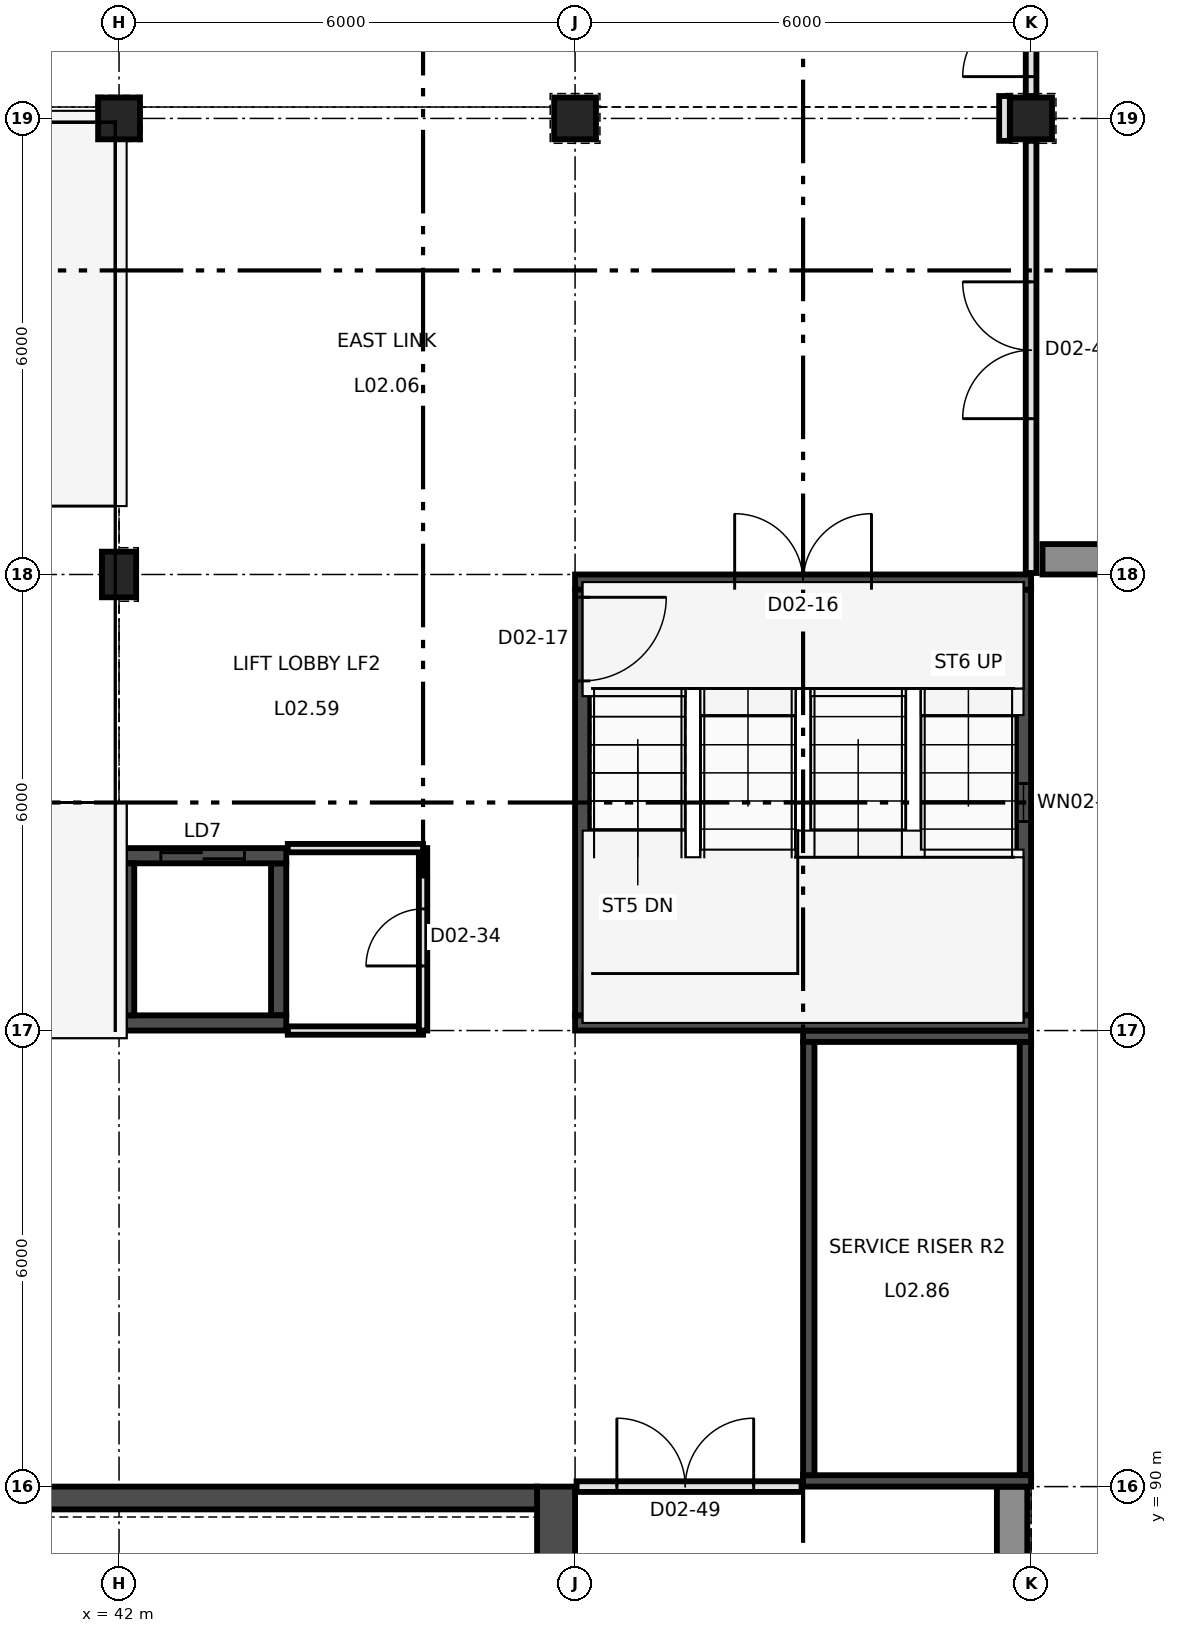
"""IFC4 building model, lengths in metres.
Left out: names, types, materials, properties, quantities, classifications, styles, units other than length and angle.
Written with IfcOpenShell. Run it as: python <this file> out.ifc"""

import sys

from ifc_helpers import new_model, si_unit, direction, frame, frame_2d, origin, origin_2d, place, context, subcontext, project, spatial, rectangle, extrude, element, fill, save


model = new_model("IFC4")
c1 = context("Model", 3, precision=1e-05, world=origin(), true_north=direction((0.0, 1.0)))
c2 = subcontext(c1, "Body", "Model", "MODEL_VIEW")
j1 = project(units=[si_unit("LENGTHUNIT", "METRE"), si_unit("PLANEANGLEUNIT", "RADIAN")], contexts=[c1])
p1 = place(None, origin())
s1 = spatial("IfcSite", under=j1, at=p1, CompositionType="ELEMENT")
p2 = place(p1, origin())
s2 = spatial("IfcBuilding", under=s1, at=p2, CompositionType="ELEMENT")
p3 = place(p2, frame((0.0, 0.0, 12.0)))
s3 = spatial("IfcBuildingStorey", under=s2, at=p3, CompositionType="ELEMENT", Elevation=12.0)
p4 = place(p3, frame((42.0, 102.0, 0.0), z_axis=(0.0, 0.0, 1.0), x_axis=(1.0, 0.0, 0.0)))
e1 = element("IfcColumn", 1, at=p4, inside=s3, PredefinedType="COLUMN", context=c2, shape_type="SweptSolid", body=[
    extrude(rectangle(XDim=0.45, YDim=0.6, at=origin_2d()), origin(), (0.0, 0.0, 1.0), 4.5),
])
for number, where, z_axis, x_axis in (
    (2, (42.0, 108.0, 0.0), (0.0, 0.0, 1.0), (1.0, 0.0, 0.0)),
    (3, (48.0, 108.0, 0.0), (0.0, 0.0, 1.0), (1.0, 0.0, 0.0)),
):
    element("IfcColumn", number, at=place(p3, frame(where, z_axis=z_axis, x_axis=x_axis)), inside=s3, PredefinedType="COLUMN", context=c2, shape_type="SweptSolid", body=[
        extrude(rectangle(XDim=0.55, YDim=0.55, at=origin_2d()), origin(), (0.0, 0.0, 1.0), 4.5),
    ])
p5 = place(p3, frame((54.0, 108.0, 0.0), z_axis=(0.0, 0.0, 1.0), x_axis=(1.0, 0.0, 0.0)))
e4 = element("IfcColumn", 4, at=p5, inside=s3, PredefinedType="COLUMN", context=c2, shape_type="SweptSolid", body=[
    extrude(rectangle(XDim=0.55, YDim=0.55, at=origin_2d()), origin(), (0.0, 0.0, 1.0), 4.25),
])
p6 = place(p3, frame((48.0, 101.9, 0.0), z_axis=(0.0, 0.0, 1.0), x_axis=(1.0, 0.0, 0.0)))
e5 = element("IfcWall", 5, at=p6, inside=s3, PredefinedType="SHEAR", context=c2, shape_type="SweptSolid", body=[
    extrude(rectangle(XDim=6.0, YDim=0.2, at=frame_2d((3.0, 0.0))), origin(), (0.0, 0.0, 1.0), 4.5),
])
p7 = place(p6, frame((2.1, 0.0, 0.0)))
e6 = element("IfcOpeningElement", 6, at=p7, cuts=e5, PredefinedType="OPENING", context=c2, shape_type="SweptSolid", body=[
    extrude(rectangle(XDim=1.8, YDim=2.2, at=frame_2d((0.9, 1.1))), frame((0.0, 0.11, 0.0), z_axis=(0.0, -1.0, 0.0), x_axis=(1.0, 0.0, 0.0)), (0.0, 0.0, 1.0), 0.22),
])
p8 = place(p3, frame((48.0, 96.1, 0.0), z_axis=(0.0, 0.0, 1.0), x_axis=(1.0, 0.0, 0.0)))
e7 = element("IfcWall", 7, at=p8, inside=s3, PredefinedType="SHEAR", context=c2, shape_type="SweptSolid", body=[
    extrude(rectangle(XDim=6.0, YDim=0.2, at=frame_2d((3.0, 0.0))), origin(), (0.0, 0.0, 1.0), 4.5),
])
p9 = place(p3, frame((48.1, 96.2, 0.0), z_axis=(0.0, 0.0, 1.0), x_axis=(0.0, 1.0, 0.0)))
e8 = element("IfcWall", 8, at=p9, inside=s3, PredefinedType="SHEAR", context=c2, shape_type="SweptSolid", body=[
    extrude(rectangle(XDim=5.6, YDim=0.2, at=frame_2d((2.8, 0.0))), origin(), (0.0, 0.0, 1.0), 4.5),
])
p10 = place(p9, frame((4.4, 0.0, 0.0)))
e9 = element("IfcOpeningElement", 9, at=p10, cuts=e8, PredefinedType="OPENING", context=c2, shape_type="SweptSolid", body=[
    extrude(rectangle(XDim=1.1, YDim=2.2, at=frame_2d((0.55, 1.1))), frame((0.0, 0.11, 0.0), z_axis=(0.0, -1.0, 0.0), x_axis=(1.0, 0.0, 0.0)), (0.0, 0.0, 1.0), 0.22),
])
p11 = place(p3, frame((53.9, 96.2, 0.0), z_axis=(0.0, 0.0, 1.0), x_axis=(0.0, 1.0, 0.0)))
e10 = element("IfcWall", 10, at=p11, inside=s3, PredefinedType="SHEAR", context=c2, shape_type="SweptSolid", body=[
    extrude(rectangle(XDim=5.6, YDim=0.2, at=frame_2d((2.8, 0.0))), origin(), (0.0, 0.0, 1.0), 4.5),
])
p12 = place(p11, frame((2.55, 0.0, 0.9)))
e11 = element("IfcOpeningElement", 11, at=p12, cuts=e10, PredefinedType="OPENING", context=c2, shape_type="SweptSolid", body=[
    extrude(rectangle(XDim=0.5, YDim=2.1, at=frame_2d((0.25, 1.05))), frame((0.0, 0.11, 0.0), z_axis=(0.0, -1.0, 0.0), x_axis=(1.0, 0.0, 0.0)), (0.0, 0.0, 1.0), 0.22),
])
p13 = place(p3, frame((42.0, 98.3, 0.0), z_axis=(0.0, 0.0, 1.0), x_axis=(1.0, 0.0, 0.0)))
e12 = element("IfcWall", 12, at=p13, inside=s3, PredefinedType="SHEAR", context=c2, shape_type="SweptSolid", body=[
    extrude(rectangle(XDim=2.2, YDim=0.2, at=frame_2d((1.1, 0.0))), origin(), (0.0, 0.0, 1.0), 4.5),
])
p14 = place(p13, frame((0.55, 0.0, 0.0)))
e13 = element("IfcOpeningElement", 13, at=p14, cuts=e12, PredefinedType="OPENING", context=c2, shape_type="SweptSolid", body=[
    extrude(rectangle(XDim=1.1, YDim=2.1, at=frame_2d((0.55, 1.05))), frame((0.0, 0.11, 0.0), z_axis=(0.0, -1.0, 0.0), x_axis=(1.0, 0.0, 0.0)), (0.0, 0.0, 1.0), 0.22),
])
p15 = place(p3, frame((42.0, 96.1, 0.0), z_axis=(0.0, 0.0, 1.0), x_axis=(1.0, 0.0, 0.0)))
e14 = element("IfcWall", 14, at=p15, inside=s3, PredefinedType="SHEAR", context=c2, shape_type="SweptSolid", body=[
    extrude(rectangle(XDim=2.2, YDim=0.2, at=frame_2d((1.1, 0.0))), origin(), (0.0, 0.0, 1.0), 4.5),
])
for number, where, z_axis, x_axis in (
    (15, (42.1, 96.2, 0.0), (0.0, 0.0, 1.0), (0.0, 1.0, 0.0)),
    (16, (44.1, 96.2, 0.0), (0.0, 0.0, 1.0), (0.0, 1.0, 0.0)),
):
    element("IfcWall", number, at=place(p3, frame(where, z_axis=z_axis, x_axis=x_axis)), inside=s3, PredefinedType="SHEAR", context=c2, shape_type="SweptSolid", body=[
        extrude(rectangle(XDim=2.0, YDim=0.2, at=frame_2d((1.0, 0.0))), origin(), (0.0, 0.0, 1.0), 4.5),
    ])
for number, where, z_axis, x_axis in (
    (17, (51.0, 95.925, 0.0), (0.0, 0.0, 1.0), (1.0, 0.0, 0.0)),
    (18, (51.0, 90.075, 0.0), (0.0, 0.0, 1.0), (1.0, 0.0, 0.0)),
):
    element("IfcWall", number, at=place(p3, frame(where, z_axis=z_axis, x_axis=x_axis)), inside=s3, PredefinedType="SHEAR", context=c2, shape_type="SweptSolid", body=[
        extrude(rectangle(XDim=3.0, YDim=0.15, at=frame_2d((1.5, 0.0))), origin(), (0.0, 0.0, 1.0), 4.5),
    ])
for number, where, z_axis, x_axis in (
    (19, (51.075, 90.15, 0.0), (0.0, 0.0, 1.0), (0.0, 1.0, 0.0)),
    (20, (53.925, 90.15, 0.0), (0.0, 0.0, 1.0), (0.0, 1.0, 0.0)),
):
    element("IfcWall", number, at=place(p3, frame(where, z_axis=z_axis, x_axis=x_axis)), inside=s3, PredefinedType="SHEAR", context=c2, shape_type="SweptSolid", body=[
        extrude(rectangle(XDim=5.7, YDim=0.15, at=frame_2d((2.85, 0.0))), origin(), (0.0, 0.0, 1.0), 4.5),
    ])
p16 = place(p3, frame((47.75, 54.5, 0.0), z_axis=(0.0, 0.0, 1.0), x_axis=(0.0, 1.0, 0.0)))
e21 = element("IfcWall", 21, at=p16, inside=s3, PredefinedType="SHEAR", context=c2, shape_type="SweptSolid", body=[
    extrude(rectangle(XDim=35.5, YDim=0.5, at=frame_2d((17.75, 0.0))), origin(), (0.0, 0.0, 1.0), 4.5),
])
p17 = place(p16, frame((25.35, 0.0, 0.0)))
e22 = element("IfcOpeningElement", 22, at=p17, cuts=e21, PredefinedType="OPENING", context=c2, shape_type="SweptSolid", body=[
    extrude(rectangle(XDim=1.3, YDim=2.1, at=frame_2d((0.65, 1.05))), frame((0.0, 0.26, 0.0), z_axis=(0.0, -1.0, 0.0), x_axis=(1.0, 0.0, 0.0)), (0.0, 0.0, 1.0), 0.52),
])
p18 = place(p3, frame((18.5, 89.85, 0.0), z_axis=(0.0, 0.0, 1.0), x_axis=(1.0, 0.0, 0.0)))
e23 = element("IfcWall", 23, at=p18, inside=s3, PredefinedType="SHEAR", context=c2, shape_type="SweptSolid", body=[
    extrude(rectangle(XDim=29.0, YDim=0.3, at=frame_2d((14.5, 0.0))), origin(), (0.0, 0.0, 1.0), 4.5),
])
p19 = place(p3, frame((60.0, 102.2, 0.0), z_axis=(0.0, 0.0, 1.0), x_axis=(-1.0, 0.0, 0.0)))
e24 = element("IfcWall", 24, at=p19, inside=s3, PredefinedType="SOLIDWALL", context=c2, shape_type="SweptSolid", body=[
    extrude(rectangle(XDim=5.85, YDim=0.4, at=frame_2d((2.925, 0.0))), origin(), (0.0, 0.0, 1.0), 4.25),
])
p20 = place(p19, frame((1.725, 0.0, 0.9)))
e25 = element("IfcOpeningElement", 25, at=p20, cuts=e24, PredefinedType="OPENING", context=c2, shape_type="SweptSolid", body=[
    extrude(rectangle(XDim=2.4, YDim=2.45, at=frame_2d((1.2, 1.225))), frame((0.0, 0.21, 0.0), z_axis=(0.0, -1.0, 0.0), x_axis=(1.0, 0.0, 0.0)), (0.0, 0.0, 1.0), 0.42),
])
p21 = place(p3, frame((53.75, 90.0, 0.0), z_axis=(0.0, 0.0, 1.0), x_axis=(0.0, -1.0, 0.0)))
e26 = element("IfcWall", 26, at=p21, inside=s3, PredefinedType="SOLIDWALL", context=c2, shape_type="SweptSolid", body=[
    extrude(rectangle(XDim=5.7, YDim=0.4, at=frame_2d((2.85, 0.0))), origin(), (0.0, 0.0, 1.0), 3.55),
])
p22 = place(p3, frame((44.22, 96.0, 0.0), z_axis=(0.0, 0.0, 1.0), x_axis=(1.0, 0.0, 0.0)))
e27 = element("IfcWall", 27, at=p22, inside=s3, PredefinedType="PARTITIONING", context=c2, shape_type="SweptSolid", body=[
    extrude(rectangle(XDim=1.78, YDim=0.11, at=frame_2d((0.89, 0.0))), origin(), (0.0, 0.0, 1.0), 3.65),
])
p23 = place(p3, frame((46.0, 96.0, 0.0), z_axis=(0.0, 0.0, 1.0), x_axis=(0.0, 1.0, 0.0)))
e28 = element("IfcWall", 28, at=p23, inside=s3, PredefinedType="PARTITIONING", context=c2, shape_type="SweptSolid", body=[
    extrude(rectangle(XDim=2.4, YDim=0.11, at=frame_2d((1.2, 0.0))), origin(), (0.0, 0.0, 1.0), 3.65),
])
p24 = place(p23, frame((0.85, 0.0, 0.0)))
e29 = element("IfcOpeningElement", 29, at=p24, cuts=e28, PredefinedType="OPENING", context=c2, shape_type="SweptSolid", body=[
    extrude(rectangle(XDim=0.75, YDim=2.04, at=frame_2d((0.375, 1.02))), frame((0.0, 0.065, 0.0), z_axis=(0.0, -1.0, 0.0), x_axis=(1.0, 0.0, 0.0)), (0.0, 0.0, 1.0), 0.13),
])
p25 = place(p3, frame((44.22, 98.4, 0.0), z_axis=(0.0, 0.0, 1.0), x_axis=(1.0, 0.0, 0.0)))
e30 = element("IfcWall", 30, at=p25, inside=s3, PredefinedType="PARTITIONING", context=c2, shape_type="SweptSolid", body=[
    extrude(rectangle(XDim=1.78, YDim=0.11, at=frame_2d((0.89, 0.0))), origin(), (0.0, 0.0, 1.0), 4.25),
])
p26 = place(p3, frame((48.02, 90.0, 0.0), z_axis=(0.0, 0.0, 1.0), x_axis=(1.0, 0.0, 0.0)))
e31 = element("IfcWall", 31, at=p26, inside=s3, PredefinedType="PARTITIONING", context=c2, shape_type="SweptSolid", body=[
    extrude(rectangle(XDim=2.96, YDim=0.14, at=frame_2d((1.48, 0.0))), origin(), (0.0, 0.0, 1.0), 3.65),
])
p27 = place(p26, frame((0.53, 0.0, 0.0)))
e32 = element("IfcOpeningElement", 32, at=p27, cuts=e31, PredefinedType="OPENING", context=c2, shape_type="SweptSolid", body=[
    extrude(rectangle(XDim=1.8, YDim=2.1, at=frame_2d((0.9, 1.05))), frame((0.0, 0.08, 0.0), z_axis=(0.0, -1.0, 0.0), x_axis=(1.0, 0.0, 0.0)), (0.0, 0.0, 1.0), 0.16),
])
p28 = place(p3, frame((54.0, 102.02, 0.0), z_axis=(0.0, 0.0, 1.0), x_axis=(0.0, 1.0, 0.0)))
e33 = element("IfcWall", 33, at=p28, inside=s3, PredefinedType="PARTITIONING", context=c2, shape_type="SweptSolid", body=[
    extrude(rectangle(XDim=5.685, YDim=0.14, at=frame_2d((2.843, 0.0))), origin(), (0.0, 0.0, 1.0), 3.55),
])
p29 = place(p28, frame((2.03, 0.0, 0.0)))
e34 = element("IfcOpeningElement", 34, at=p29, cuts=e33, PredefinedType="OPENING", context=c2, shape_type="SweptSolid", body=[
    extrude(rectangle(XDim=1.8, YDim=2.1, at=frame_2d((0.9, 1.05))), frame((0.0, 0.08, 0.0), z_axis=(0.0, -1.0, 0.0), x_axis=(1.0, 0.0, 0.0)), (0.0, 0.0, 1.0), 0.16),
])
p30 = place(p3, frame((54.0, 108.295, 0.0), z_axis=(0.0, 0.0, 1.0), x_axis=(0.0, 1.0, 0.0)))
e35 = element("IfcWall", 35, at=p30, inside=s3, PredefinedType="PARTITIONING", context=c2, shape_type="SweptSolid", body=[
    extrude(rectangle(XDim=5.41, YDim=0.14, at=frame_2d((2.705, 0.0))), origin(), (0.0, 0.0, 1.0), 3.45),
])
p31 = place(p30, frame((0.255, 0.0, 0.0)))
e36 = element("IfcOpeningElement", 36, at=p31, cuts=e35, PredefinedType="OPENING", context=c2, shape_type="SweptSolid", body=[
    extrude(rectangle(XDim=1.8, YDim=2.1, at=frame_2d((0.9, 1.05))), frame((0.0, 0.08, 0.0), z_axis=(0.0, -1.0, 0.0), x_axis=(1.0, 0.0, 0.0)), (0.0, 0.0, 1.0), 0.16),
])
p32 = place(p3, frame((53.65, 107.705, 0.0), z_axis=(0.0, 0.0, 1.0), x_axis=(0.0, 1.0, 0.0)))
e37 = element("IfcWall", 37, at=p32, inside=s3, PredefinedType="PARTITIONING", context=c2, shape_type="SweptSolid", body=[
    extrude(rectangle(XDim=0.59, YDim=0.14, at=frame_2d((0.295, 0.0))), origin(), (0.0, 0.0, 1.0), 3.55),
])
p33 = place(p12, origin())
e38 = element("IfcWindow", 38, at=p33, inside=s3, PartitioningType="SINGLE_PANEL", PredefinedType="WINDOW", context=c2, shape_type="SweptSolid", body=[
    extrude(rectangle(XDim=0.5, YDim=2.1, at=frame_2d((0.25, 1.05))), frame((0.0, 0.03, 0.0), z_axis=(0.0, -1.0, 0.0), x_axis=(1.0, 0.0, 0.0)), (0.0, 0.0, 1.0), 0.06),
])
fill(e11, e38)
p34 = place(p7, frame((1.8, 0.0, 0.0), z_axis=(0.0, 0.0, 1.0), x_axis=(-1.0, 0.0, 0.0)))
e39 = element("IfcDoor", 39, at=p34, inside=s3, OperationType="DOUBLE_DOOR_SINGLE_SWING", PredefinedType="DOOR", context=c2, shape_type="SweptSolid", body=[
    extrude(rectangle(XDim=1.8, YDim=2.2, at=frame_2d((0.9, 1.1))), frame((0.0, 0.025, 0.0), z_axis=(0.0, -1.0, 0.0), x_axis=(1.0, 0.0, 0.0)), (0.0, 0.0, 1.0), 0.05),
])
fill(e6, e39)
p35 = place(p10, frame((1.1, 0.0, 0.0), z_axis=(0.0, 0.0, 1.0), x_axis=(-1.0, 0.0, 0.0)))
e40 = element("IfcDoor", 40, at=p35, inside=s3, OperationType="SINGLE_SWING_RIGHT", PredefinedType="DOOR", context=c2, shape_type="SweptSolid", body=[
    extrude(rectangle(XDim=1.1, YDim=2.2, at=frame_2d((0.55, 1.1))), frame((0.0, 0.025, 0.0), z_axis=(0.0, -1.0, 0.0), x_axis=(1.0, 0.0, 0.0)), (0.0, 0.0, 1.0), 0.05),
])
fill(e9, e40)
p36 = place(p24, origin())
e41 = element("IfcDoor", 41, at=p36, inside=s3, OperationType="SINGLE_SWING_LEFT", PredefinedType="DOOR", context=c2, shape_type="SweptSolid", body=[
    extrude(rectangle(XDim=0.75, YDim=2.04, at=frame_2d((0.375, 1.02))), frame((0.0, 0.025, 0.0), z_axis=(0.0, -1.0, 0.0), x_axis=(1.0, 0.0, 0.0)), (0.0, 0.0, 1.0), 0.05),
])
fill(e29, e41)
p37 = place(p29, origin())
e42 = element("IfcDoor", 42, at=p37, inside=s3, OperationType="DOUBLE_DOOR_SINGLE_SWING", PredefinedType="DOOR", context=c2, shape_type="SweptSolid", body=[
    extrude(rectangle(XDim=1.8, YDim=2.1, at=frame_2d((0.9, 1.05))), frame((0.0, 0.025, 0.0), z_axis=(0.0, -1.0, 0.0), x_axis=(1.0, 0.0, 0.0)), (0.0, 0.0, 1.0), 0.05),
])
fill(e34, e42)
p38 = place(p31, origin())
e43 = element("IfcDoor", 43, at=p38, inside=s3, OperationType="DOUBLE_DOOR_SINGLE_SWING", PredefinedType="DOOR", context=c2, shape_type="SweptSolid", body=[
    extrude(rectangle(XDim=1.8, YDim=2.1, at=frame_2d((0.9, 1.05))), frame((0.0, 0.025, 0.0), z_axis=(0.0, -1.0, 0.0), x_axis=(1.0, 0.0, 0.0)), (0.0, 0.0, 1.0), 0.05),
])
fill(e36, e43)
p39 = place(p27, frame((1.8, 0.0, 0.0), z_axis=(0.0, 0.0, 1.0), x_axis=(-1.0, 0.0, 0.0)))
e44 = element("IfcDoor", 44, at=p39, inside=s3, OperationType="DOUBLE_DOOR_SINGLE_SWING", PredefinedType="DOOR", context=c2, shape_type="SweptSolid", body=[
    extrude(rectangle(XDim=1.8, YDim=2.1, at=frame_2d((0.9, 1.05))), frame((0.0, 0.025, 0.0), z_axis=(0.0, -1.0, 0.0), x_axis=(1.0, 0.0, 0.0)), (0.0, 0.0, 1.0), 0.05),
])
fill(e32, e44)
p40 = place(p14, origin())
e45 = element("IfcDoor", 45, at=p40, inside=s3, OperationType="DOUBLE_DOOR_SLIDING", PredefinedType="DOOR", context=c2, shape_type="SweptSolid", body=[
    extrude(rectangle(XDim=1.1, YDim=2.1, at=frame_2d((0.55, 1.05))), frame((0.0, 0.025, 0.0), z_axis=(0.0, -1.0, 0.0), x_axis=(1.0, 0.0, 0.0)), (0.0, 0.0, 1.0), 0.05),
])
fill(e13, e45)
save(model, sys.argv[1])
